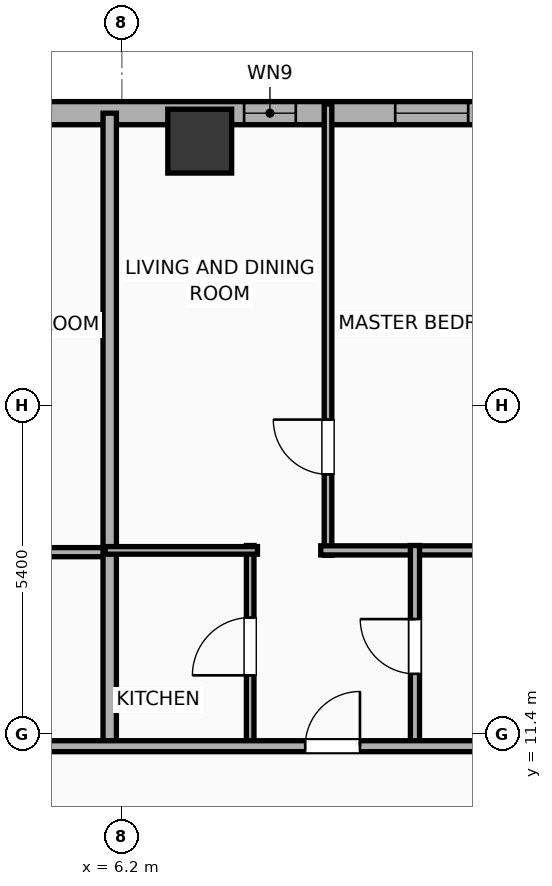
"""IFC4 building model, lengths in metres.
Left out: names, types, materials, properties, quantities, classifications, styles, units other than length and angle.
Written with IfcOpenShell. Run it as: python <this file> out.ifc"""

import sys

from ifc_helpers import new_model, si_unit, direction, frame, frame_2d, origin, origin_2d, place, context, subcontext, project, spatial, rectangle, hollow_rectangle, extrude, element, fill, save


model = new_model("IFC4")
c1 = context("Model", 3, precision=1e-05, world=origin(), true_north=direction((0.0, 1.0)))
c2 = subcontext(c1, "Body", "Model", "MODEL_VIEW")
j1 = project(units=[si_unit("LENGTHUNIT", "METRE"), si_unit("PLANEANGLEUNIT", "RADIAN")], contexts=[c1])
p1 = place(None, origin())
s1 = spatial("IfcSite", under=j1, at=p1, CompositionType="ELEMENT")
p2 = place(p1, origin())
s2 = spatial("IfcBuilding", under=s1, at=p2, CompositionType="ELEMENT")
p3 = place(p2, frame((0.0, 0.0, 120.9)))
s3 = spatial("IfcBuildingStorey", under=s2, at=p3, CompositionType="ELEMENT", Elevation=120.9)
p4 = place(p3, frame((7.48, 21.15, 0.0), z_axis=(0.0, 0.0, 1.0), x_axis=(1.0, 0.0, 0.0)))
e1 = element("IfcColumn", 1, at=p4, inside=s3, PredefinedType="COLUMN", context=c2, shape_type="SweptSolid", body=[
    extrude(hollow_rectangle(XDim=1.05, YDim=1.05, WallThickness=0.036, at=origin_2d()), origin(), (0.0, 0.0, 1.0), 3.9),
])
p5 = place(p3, frame((-25.381, 21.61, 0.0), z_axis=(0.0, 0.0, 1.0), x_axis=(1.0, 0.0, 0.0)))
e2 = element("IfcWall", 2, at=p5, inside=s3, PredefinedType="ELEMENTEDWALL", context=c2, shape_type="SweptSolid", body=[
    extrude(rectangle(XDim=54.763, YDim=0.38, at=frame_2d((27.381, 0.0))), origin(), (0.0, 0.0, 1.0), 3.65),
])
p6 = place(p5, frame((7.295, 0.0, 0.75)))
e3 = element("IfcOpeningElement", 3, at=p6, cuts=e2, PredefinedType="OPENING", context=c2, shape_type="SweptSolid", body=[
    extrude(rectangle(XDim=2.4, YDim=2.1, at=frame_2d((1.2, 1.05))), frame((0.0, 0.2, 0.0), z_axis=(0.0, -1.0, 0.0), x_axis=(1.0, 0.0, 0.0)), (0.0, 0.0, 1.0), 0.4),
])
p7 = place(p5, frame((17.686, 0.0, 0.75)))
e4 = element("IfcOpeningElement", 4, at=p7, cuts=e2, PredefinedType="OPENING", context=c2, shape_type="SweptSolid", body=[
    extrude(rectangle(XDim=2.4, YDim=2.1, at=frame_2d((1.2, 1.05))), frame((0.0, 0.2, 0.0), z_axis=(0.0, -1.0, 0.0), x_axis=(1.0, 0.0, 0.0)), (0.0, 0.0, 1.0), 0.4),
])
p8 = place(p5, frame((45.867, 0.0, 0.75)))
e5 = element("IfcOpeningElement", 5, at=p8, cuts=e2, PredefinedType="OPENING", context=c2, shape_type="SweptSolid", body=[
    extrude(rectangle(XDim=2.4, YDim=2.1, at=frame_2d((1.2, 1.05))), frame((0.0, 0.2, 0.0), z_axis=(0.0, -1.0, 0.0), x_axis=(1.0, 0.0, 0.0)), (0.0, 0.0, 1.0), 0.4),
])
p9 = place(p5, frame((1.481, 0.0, 0.75)))
e6 = element("IfcOpeningElement", 6, at=p9, cuts=e2, PredefinedType="OPENING", context=c2, shape_type="SweptSolid", body=[
    extrude(rectangle(XDim=1.2, YDim=2.05, at=frame_2d((0.6, 1.025))), frame((0.0, 0.2, 0.0), z_axis=(0.0, -1.0, 0.0), x_axis=(1.0, 0.0, 0.0)), (0.0, 0.0, 1.0), 0.4),
])
p10 = place(p5, frame((4.522, 0.0, 0.75)))
e7 = element("IfcOpeningElement", 7, at=p10, cuts=e2, PredefinedType="OPENING", context=c2, shape_type="SweptSolid", body=[
    extrude(rectangle(XDim=1.2, YDim=2.05, at=frame_2d((0.6, 1.025))), frame((0.0, 0.2, 0.0), z_axis=(0.0, -1.0, 0.0), x_axis=(1.0, 0.0, 0.0)), (0.0, 0.0, 1.0), 0.4),
])
p11 = place(p5, frame((11.696, 0.0, 0.75)))
e8 = element("IfcOpeningElement", 8, at=p11, cuts=e2, PredefinedType="OPENING", context=c2, shape_type="SweptSolid", body=[
    extrude(rectangle(XDim=1.2, YDim=2.05, at=frame_2d((0.6, 1.025))), frame((0.0, 0.2, 0.0), z_axis=(0.0, -1.0, 0.0), x_axis=(1.0, 0.0, 0.0)), (0.0, 0.0, 1.0), 0.4),
])
p12 = place(p5, frame((15.076, 0.0, 0.75)))
e9 = element("IfcOpeningElement", 9, at=p12, cuts=e2, PredefinedType="OPENING", context=c2, shape_type="SweptSolid", body=[
    extrude(rectangle(XDim=1.2, YDim=2.05, at=frame_2d((0.6, 1.025))), frame((0.0, 0.2, 0.0), z_axis=(0.0, -1.0, 0.0), x_axis=(1.0, 0.0, 0.0)), (0.0, 0.0, 1.0), 0.4),
])
p13 = place(p5, frame((22.676, 0.0, 0.75)))
e10 = element("IfcOpeningElement", 10, at=p13, cuts=e2, PredefinedType="OPENING", context=c2, shape_type="SweptSolid", body=[
    extrude(rectangle(XDim=1.2, YDim=2.05, at=frame_2d((0.6, 1.025))), frame((0.0, 0.2, 0.0), z_axis=(0.0, -1.0, 0.0), x_axis=(1.0, 0.0, 0.0)), (0.0, 0.0, 1.0), 0.4),
])
p14 = place(p5, frame((25.576, 0.0, 0.75)))
e11 = element("IfcOpeningElement", 11, at=p14, cuts=e2, PredefinedType="OPENING", context=c2, shape_type="SweptSolid", body=[
    extrude(rectangle(XDim=1.2, YDim=2.05, at=frame_2d((0.6, 1.025))), frame((0.0, 0.2, 0.0), z_axis=(0.0, -1.0, 0.0), x_axis=(1.0, 0.0, 0.0)), (0.0, 0.0, 1.0), 0.4),
])
p15 = place(p5, frame((29.076, 0.0, 0.75)))
e12 = element("IfcOpeningElement", 12, at=p15, cuts=e2, PredefinedType="OPENING", context=c2, shape_type="SweptSolid", body=[
    extrude(rectangle(XDim=1.2, YDim=2.05, at=frame_2d((0.6, 1.025))), frame((0.0, 0.2, 0.0), z_axis=(0.0, -1.0, 0.0), x_axis=(1.0, 0.0, 0.0)), (0.0, 0.0, 1.0), 0.4),
])
p16 = place(p5, frame((33.591, 0.0, 0.75)))
e13 = element("IfcOpeningElement", 13, at=p16, cuts=e2, PredefinedType="OPENING", context=c2, shape_type="SweptSolid", body=[
    extrude(rectangle(XDim=0.85, YDim=2.05, at=frame_2d((0.425, 1.025))), frame((0.0, 0.2, 0.0), z_axis=(0.0, -1.0, 0.0), x_axis=(1.0, 0.0, 0.0)), (0.0, 0.0, 1.0), 0.4),
])
p17 = place(p5, frame((36.076, 0.0, 0.75)))
e14 = element("IfcOpeningElement", 14, at=p17, cuts=e2, PredefinedType="OPENING", context=c2, shape_type="SweptSolid", body=[
    extrude(rectangle(XDim=1.2, YDim=2.05, at=frame_2d((0.6, 1.025))), frame((0.0, 0.2, 0.0), z_axis=(0.0, -1.0, 0.0), x_axis=(1.0, 0.0, 0.0)), (0.0, 0.0, 1.0), 0.4),
])
p18 = place(p5, frame((39.446, 0.0, 0.75)))
e15 = element("IfcOpeningElement", 15, at=p18, cuts=e2, PredefinedType="OPENING", context=c2, shape_type="SweptSolid", body=[
    extrude(rectangle(XDim=1.2, YDim=2.05, at=frame_2d((0.6, 1.025))), frame((0.0, 0.2, 0.0), z_axis=(0.0, -1.0, 0.0), x_axis=(1.0, 0.0, 0.0)), (0.0, 0.0, 1.0), 0.4),
])
p19 = place(p5, frame((42.27, 0.0, 0.75)))
e16 = element("IfcOpeningElement", 16, at=p19, cuts=e2, PredefinedType="OPENING", context=c2, shape_type="SweptSolid", body=[
    extrude(rectangle(XDim=0.85, YDim=2.05, at=frame_2d((0.425, 1.025))), frame((0.0, 0.2, 0.0), z_axis=(0.0, -1.0, 0.0), x_axis=(1.0, 0.0, 0.0)), (0.0, 0.0, 1.0), 0.4),
])
p20 = place(p5, frame((49.554, 0.0, 0.75)))
e17 = element("IfcOpeningElement", 17, at=p20, cuts=e2, PredefinedType="OPENING", context=c2, shape_type="SweptSolid", body=[
    extrude(rectangle(XDim=1.2, YDim=2.05, at=frame_2d((0.6, 1.025))), frame((0.0, 0.2, 0.0), z_axis=(0.0, -1.0, 0.0), x_axis=(1.0, 0.0, 0.0)), (0.0, 0.0, 1.0), 0.4),
])
p21 = place(p5, frame((52.266, 0.0, 0.75)))
e18 = element("IfcOpeningElement", 18, at=p21, cuts=e2, PredefinedType="OPENING", context=c2, shape_type="SweptSolid", body=[
    extrude(rectangle(XDim=1.2, YDim=2.05, at=frame_2d((0.6, 1.025))), frame((0.0, 0.2, 0.0), z_axis=(0.0, -1.0, 0.0), x_axis=(1.0, 0.0, 0.0)), (0.0, 0.0, 1.0), 0.4),
])
p22 = place(p3, frame((2.47, 14.391, 0.0), z_axis=(0.0, 0.0, 1.0), x_axis=(1.0, 0.0, 0.0)))
e19 = element("IfcWall", 19, at=p22, inside=s3, PredefinedType="PLUMBINGWALL", context=c2, shape_type="SweptSolid", body=[
    extrude(rectangle(XDim=3.605, YDim=0.15, at=frame_2d((1.802, 0.0))), origin(), (0.0, 0.0, 1.0), 3.65),
])
p23 = place(p3, frame((6.0, 11.12, 0.0), z_axis=(0.0, 0.0, 1.0), x_axis=(0.0, 1.0, 0.0)))
e20 = element("IfcWall", 20, at=p23, inside=s3, PredefinedType="PARTITIONING", context=c2, shape_type="SweptSolid", body=[
    extrude(rectangle(XDim=10.49, YDim=0.22, at=frame_2d((5.245, 0.0))), origin(), (0.0, 0.0, 1.0), 3.04),
])
p24 = place(p3, frame((9.59, 14.34, 0.0), z_axis=(0.0, 0.0, 1.0), x_axis=(0.0, 1.0, 0.0)))
e21 = element("IfcWall", 21, at=p24, inside=s3, PredefinedType="PARTITIONING", context=c2, shape_type="SweptSolid", body=[
    extrude(rectangle(XDim=7.42, YDim=0.125, at=frame_2d((3.71, 0.0))), origin(), (0.0, 0.0, 1.0), 3.65),
])
p25 = place(p24, frame((1.331, 0.0, 0.0)))
e22 = element("IfcOpeningElement", 22, at=p25, cuts=e21, PredefinedType="OPENING", context=c2, shape_type="SweptSolid", body=[
    extrude(rectangle(XDim=0.9, YDim=2.05, at=frame_2d((0.45, 1.025))), frame((0.0, 0.073, 0.0), z_axis=(0.0, -1.0, 0.0), x_axis=(1.0, 0.0, 0.0)), (0.0, 0.0, 1.0), 0.145),
])
p26 = place(p3, frame((9.47, 14.42, 0.0), z_axis=(0.0, 0.0, 1.0), x_axis=(1.0, 0.0, 0.0)))
e23 = element("IfcWall", 23, at=p26, inside=s3, PredefinedType="PLUMBINGWALL", context=c2, shape_type="SweptSolid", body=[
    extrude(rectangle(XDim=3.605, YDim=0.15, at=frame_2d((1.802, 0.0))), origin(), (0.0, 0.0, 1.0), 3.65),
])
p27 = place(p3, frame((8.31, 11.18, 0.0), z_axis=(0.0, 0.0, 1.0), x_axis=(0.0, 1.0, 0.0)))
e24 = element("IfcWall", 24, at=p27, inside=s3, PredefinedType="PARTITIONING", context=c2, shape_type="SweptSolid", body=[
    extrude(rectangle(XDim=3.32, YDim=0.125, at=frame_2d((1.66, 0.0))), origin(), (0.0, 0.0, 1.0), 3.65),
])
p28 = place(p27, frame((1.185, 0.0, 0.0)))
e25 = element("IfcOpeningElement", 25, at=p28, cuts=e24, PredefinedType="OPENING", context=c2, shape_type="SweptSolid", body=[
    extrude(rectangle(XDim=0.95, YDim=2.05, at=frame_2d((0.475, 1.025))), frame((0.0, 0.073, 0.0), z_axis=(0.0, -1.0, 0.0), x_axis=(1.0, 0.0, 0.0)), (0.0, 0.0, 1.0), 0.145),
])
p29 = place(p3, frame((5.925, 14.42, 0.0), z_axis=(0.0, 0.0, 1.0), x_axis=(1.0, 0.0, 0.0)))
e26 = element("IfcWall", 26, at=p29, inside=s3, PredefinedType="PARTITIONING", context=c2, shape_type="SweptSolid", body=[
    extrude(rectangle(XDim=2.505, YDim=0.125, at=frame_2d((1.252, 0.0))), origin(), (0.0, 0.0, 1.0), 3.65),
])
p30 = place(p3, frame((11.02, 11.18, 0.0), z_axis=(0.0, 0.0, 1.0), x_axis=(0.0, 1.0, 0.0)))
e27 = element("IfcWall", 27, at=p30, inside=s3, PredefinedType="PLUMBINGWALL", context=c2, shape_type="SweptSolid", body=[
    extrude(rectangle(XDim=3.32, YDim=0.15, at=frame_2d((1.66, 0.0))), origin(), (0.0, 0.0, 1.0), 3.65),
])
p31 = place(p30, frame((1.21, 0.0, 0.0)))
e28 = element("IfcOpeningElement", 28, at=p31, cuts=e27, PredefinedType="OPENING", context=c2, shape_type="SweptSolid", body=[
    extrude(rectangle(XDim=0.9, YDim=2.05, at=frame_2d((0.45, 1.025))), frame((0.0, 0.085, 0.0), z_axis=(0.0, -1.0, 0.0), x_axis=(1.0, 0.0, 0.0)), (0.0, 0.0, 1.0), 0.17),
])
p32 = place(p3, frame((-29.21, 11.2, 0.0), z_axis=(0.0, 0.0, 1.0), x_axis=(1.0, 0.0, 0.0)))
e29 = element("IfcWall", 29, at=p32, inside=s3, PredefinedType="PARTITIONING", context=c2, shape_type="SweptSolid", body=[
    extrude(rectangle(XDim=62.42, YDim=0.18, at=frame_2d((31.21, 0.0))), origin(), (0.0, 0.0, 1.0), 3.65),
])
p33 = place(p32, frame((3.108, 0.0, 0.0)))
e30 = element("IfcOpeningElement", 30, at=p33, cuts=e29, PredefinedType="OPENING", context=c2, shape_type="SweptSolid", body=[
    extrude(rectangle(XDim=1.15, YDim=2.05, at=frame_2d((0.575, 1.025))), frame((0.0, 0.1, 0.0), z_axis=(0.0, -1.0, 0.0), x_axis=(1.0, 0.0, 0.0)), (0.0, 0.0, 1.0), 0.2),
])
p34 = place(p32, frame((10.242, 0.0, 0.0)))
e31 = element("IfcOpeningElement", 31, at=p34, cuts=e29, PredefinedType="OPENING", context=c2, shape_type="SweptSolid", body=[
    extrude(rectangle(XDim=1.15, YDim=2.05, at=frame_2d((0.575, 1.025))), frame((0.0, 0.1, 0.0), z_axis=(0.0, -1.0, 0.0), x_axis=(1.0, 0.0, 0.0)), (0.0, 0.0, 1.0), 0.2),
])
p35 = place(p32, frame((17.427, 0.0, 0.0)))
e32 = element("IfcOpeningElement", 32, at=p35, cuts=e29, PredefinedType="OPENING", context=c2, shape_type="SweptSolid", body=[
    extrude(rectangle(XDim=0.9, YDim=2.05, at=frame_2d((0.45, 1.025))), frame((0.0, 0.1, 0.0), z_axis=(0.0, -1.0, 0.0), x_axis=(1.0, 0.0, 0.0)), (0.0, 0.0, 1.0), 0.2),
])
p36 = place(p32, frame((24.424, 0.0, 0.0)))
e33 = element("IfcOpeningElement", 33, at=p36, cuts=e29, PredefinedType="OPENING", context=c2, shape_type="SweptSolid", body=[
    extrude(rectangle(XDim=0.9, YDim=2.05, at=frame_2d((0.45, 1.025))), frame((0.0, 0.1, 0.0), z_axis=(0.0, -1.0, 0.0), x_axis=(1.0, 0.0, 0.0)), (0.0, 0.0, 1.0), 0.2),
])
p37 = place(p32, frame((31.428, 0.0, 0.0)))
e34 = element("IfcOpeningElement", 34, at=p37, cuts=e29, PredefinedType="OPENING", context=c2, shape_type="SweptSolid", body=[
    extrude(rectangle(XDim=0.9, YDim=2.05, at=frame_2d((0.45, 1.025))), frame((0.0, 0.1, 0.0), z_axis=(0.0, -1.0, 0.0), x_axis=(1.0, 0.0, 0.0)), (0.0, 0.0, 1.0), 0.2),
])
p38 = place(p32, frame((38.425, 0.0, 0.0)))
e35 = element("IfcOpeningElement", 35, at=p38, cuts=e29, PredefinedType="OPENING", context=c2, shape_type="SweptSolid", body=[
    extrude(rectangle(XDim=0.9, YDim=2.05, at=frame_2d((0.45, 1.025))), frame((0.0, 0.1, 0.0), z_axis=(0.0, -1.0, 0.0), x_axis=(1.0, 0.0, 0.0)), (0.0, 0.0, 1.0), 0.2),
])
p39 = place(p32, frame((45.298, 0.0, 0.0)))
e36 = element("IfcOpeningElement", 36, at=p39, cuts=e29, PredefinedType="OPENING", context=c2, shape_type="SweptSolid", body=[
    extrude(rectangle(XDim=0.9, YDim=2.05, at=frame_2d((0.45, 1.025))), frame((0.0, 0.1, 0.0), z_axis=(0.0, -1.0, 0.0), x_axis=(1.0, 0.0, 0.0)), (0.0, 0.0, 1.0), 0.2),
])
p40 = place(p32, frame((52.033, 0.0, 0.0)))
e37 = element("IfcOpeningElement", 37, at=p40, cuts=e29, PredefinedType="OPENING", context=c2, shape_type="SweptSolid", body=[
    extrude(rectangle(XDim=0.9, YDim=2.05, at=frame_2d((0.45, 1.025))), frame((0.0, 0.1, 0.0), z_axis=(0.0, -1.0, 0.0), x_axis=(1.0, 0.0, 0.0)), (0.0, 0.0, 1.0), 0.2),
])
p41 = place(p32, frame((58.805, 0.0, 0.0)))
e38 = element("IfcOpeningElement", 38, at=p41, cuts=e29, PredefinedType="OPENING", context=c2, shape_type="SweptSolid", body=[
    extrude(rectangle(XDim=0.9, YDim=2.05, at=frame_2d((0.45, 1.025))), frame((0.0, 0.1, 0.0), z_axis=(0.0, -1.0, 0.0), x_axis=(1.0, 0.0, 0.0)), (0.0, 0.0, 1.0), 0.2),
])
p42 = place(p16, origin())
e39 = element("IfcWindow", 39, at=p42, inside=s3, PartitioningType="SINGLE_PANEL", PredefinedType="WINDOW", context=c2, shape_type="SweptSolid", body=[
    extrude(rectangle(XDim=0.85, YDim=2.05, at=frame_2d((0.425, 1.025))), frame((0.0, 0.03, 0.0), z_axis=(0.0, -1.0, 0.0), x_axis=(1.0, 0.0, 0.0)), (0.0, 0.0, 1.0), 0.06),
])
fill(e13, e39)
p43 = place(p17, origin())
e40 = element("IfcWindow", 40, at=p43, inside=s3, PartitioningType="SINGLE_PANEL", PredefinedType="WINDOW", context=c2, shape_type="SweptSolid", body=[
    extrude(rectangle(XDim=1.2, YDim=2.05, at=frame_2d((0.6, 1.025))), frame((0.0, 0.03, 0.0), z_axis=(0.0, -1.0, 0.0), x_axis=(1.0, 0.0, 0.0)), (0.0, 0.0, 1.0), 0.06),
])
fill(e14, e40)
p44 = place(p25, origin())
e41 = element("IfcDoor", 41, at=p44, inside=s3, OperationType="SINGLE_SWING_RIGHT", PredefinedType="DOOR", context=c2, shape_type="SweptSolid", body=[
    extrude(rectangle(XDim=0.9, YDim=2.05, at=frame_2d((0.45, 1.025))), frame((0.0, 0.025, 0.0), z_axis=(0.0, -1.0, 0.0), x_axis=(1.0, 0.0, 0.0)), (0.0, 0.0, 1.0), 0.05),
])
fill(e22, e41)
p45 = place(p28, origin())
e42 = element("IfcDoor", 42, at=p45, inside=s3, OperationType="SINGLE_SWING_LEFT", PredefinedType="DOOR", context=c2, shape_type="SweptSolid", body=[
    extrude(rectangle(XDim=0.95, YDim=2.05, at=frame_2d((0.475, 1.025))), frame((0.0, 0.025, 0.0), z_axis=(0.0, -1.0, 0.0), x_axis=(1.0, 0.0, 0.0)), (0.0, 0.0, 1.0), 0.05),
])
fill(e25, e42)
p46 = place(p31, origin())
e43 = element("IfcDoor", 43, at=p46, inside=s3, OperationType="SINGLE_SWING_RIGHT", PredefinedType="DOOR", context=c2, shape_type="SweptSolid", body=[
    extrude(rectangle(XDim=0.9, YDim=2.05, at=frame_2d((0.45, 1.025))), frame((0.0, 0.025, 0.0), z_axis=(0.0, -1.0, 0.0), x_axis=(1.0, 0.0, 0.0)), (0.0, 0.0, 1.0), 0.05),
])
fill(e28, e43)
p47 = place(p38, origin())
e44 = element("IfcDoor", 44, at=p47, inside=s3, OperationType="SINGLE_SWING_RIGHT", PredefinedType="DOOR", context=c2, shape_type="SweptSolid", body=[
    extrude(rectangle(XDim=0.9, YDim=2.05, at=frame_2d((0.45, 1.025))), frame((0.0, 0.025, 0.0), z_axis=(0.0, -1.0, 0.0), x_axis=(1.0, 0.0, 0.0)), (0.0, 0.0, 1.0), 0.05),
])
fill(e35, e44)
save(model, sys.argv[1])
